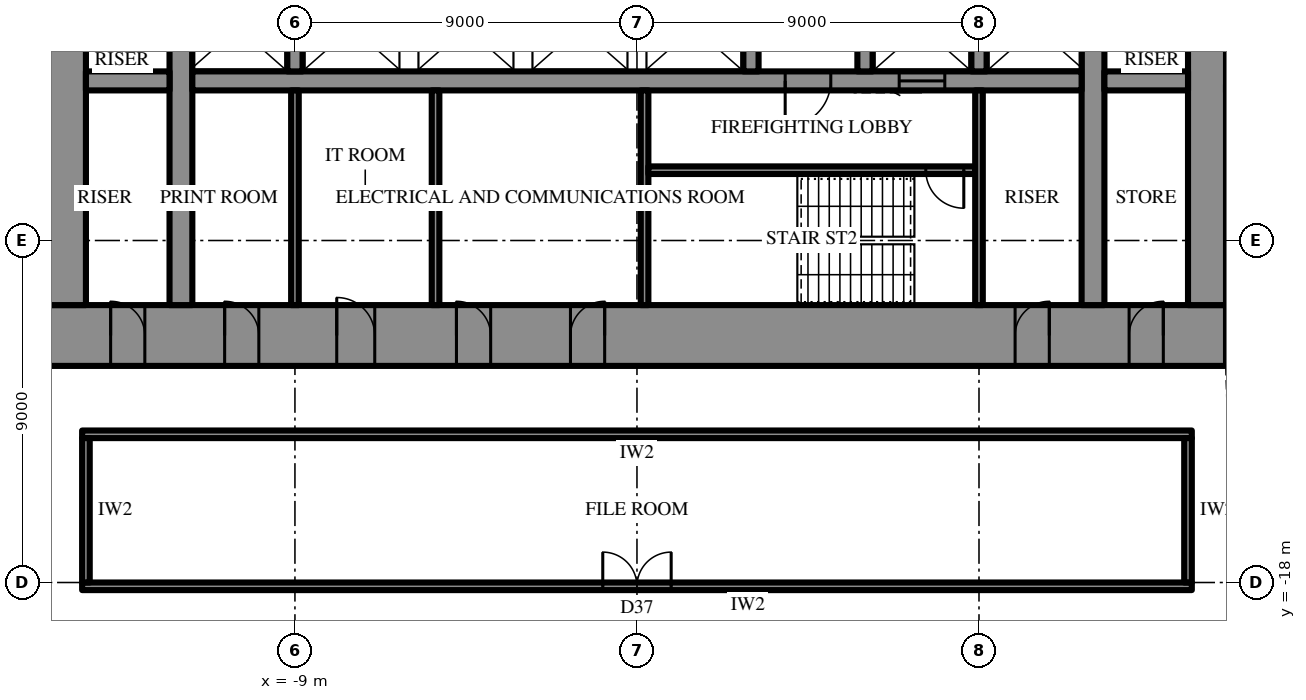
"""IFC4 building model, lengths in metres.
Left out: names, types, materials, properties, quantities, classifications, styles, units other than length and angle.
Written with IfcOpenShell. Run it as: python <this file> out.ifc"""

import sys

from ifc_helpers import new_model, si_unit, direction, frame, frame_2d, origin, place, context, subcontext, project, spatial, rectangle, extrude, element, fill, save


model = new_model("IFC4")
c1 = context("Model", 3, precision=1e-05, world=origin(), true_north=direction((0.0, 1.0)))
c2 = subcontext(c1, "Body", "Model", "MODEL_VIEW")
j1 = project(units=[si_unit("LENGTHUNIT", "METRE"), si_unit("PLANEANGLEUNIT", "RADIAN")], contexts=[c1])
p1 = place(None, origin())
s1 = spatial("IfcSite", under=j1, at=p1, CompositionType="ELEMENT")
p2 = place(p1, origin())
s2 = spatial("IfcBuilding", under=s1, at=p2, CompositionType="ELEMENT")
p3 = place(p2, frame((0.0, 0.0, 232.3)))
s3 = spatial("IfcBuildingStorey", under=s2, at=p3, CompositionType="ELEMENT", Elevation=232.3)
p4 = place(p3, frame((15.5, -11.5, 0.0), z_axis=(0.0, 0.0, 1.0), x_axis=(-1.0, 0.0, 0.0)))
e1 = element("IfcWall", 1, at=p4, inside=s3, PredefinedType="SHEAR", context=c2, shape_type="SweptSolid", body=[
    extrude(rectangle(XDim=31.0, YDim=1.6, at=frame_2d((15.5, 0.0))), origin(), (0.0, 0.0, 1.0), 4.2),
])
p5 = place(p4, frame((16.35, 0.0, 0.0)))
e2 = element("IfcOpeningElement", 2, at=p5, cuts=e1, PredefinedType="OPENING", context=c2, shape_type="SweptSolid", body=[
    extrude(rectangle(XDim=0.9, YDim=2.2, at=frame_2d((0.45, 1.1))), frame((0.0, 0.81, 0.0), z_axis=(0.0, -1.0, 0.0), x_axis=(1.0, 0.0, 0.0)), (0.0, 0.0, 1.0), 1.62),
])
p6 = place(p4, frame((19.35, 0.0, 0.0)))
e3 = element("IfcOpeningElement", 3, at=p6, cuts=e1, PredefinedType="OPENING", context=c2, shape_type="SweptSolid", body=[
    extrude(rectangle(XDim=0.9, YDim=2.2, at=frame_2d((0.45, 1.1))), frame((0.0, 0.81, 0.0), z_axis=(0.0, -1.0, 0.0), x_axis=(1.0, 0.0, 0.0)), (0.0, 0.0, 1.0), 1.62),
])
p7 = place(p4, frame((22.4, 0.0, 0.0)))
e4 = element("IfcOpeningElement", 4, at=p7, cuts=e1, PredefinedType="OPENING", context=c2, shape_type="SweptSolid", body=[
    extrude(rectangle(XDim=1.0, YDim=2.2, at=frame_2d((0.5, 1.1))), frame((0.0, 0.81, 0.0), z_axis=(0.0, -1.0, 0.0), x_axis=(1.0, 0.0, 0.0)), (0.0, 0.0, 1.0), 1.62),
])
p8 = place(p4, frame((1.65, 0.0, 0.0)))
e5 = element("IfcOpeningElement", 5, at=p8, cuts=e1, PredefinedType="OPENING", context=c2, shape_type="SweptSolid", body=[
    extrude(rectangle(XDim=0.9, YDim=2.2, at=frame_2d((0.45, 1.1))), frame((0.0, 0.81, 0.0), z_axis=(0.0, -1.0, 0.0), x_axis=(1.0, 0.0, 0.0)), (0.0, 0.0, 1.0), 1.62),
])
p9 = place(p4, frame((4.65, 0.0, 0.0)))
e6 = element("IfcOpeningElement", 6, at=p9, cuts=e1, PredefinedType="OPENING", context=c2, shape_type="SweptSolid", body=[
    extrude(rectangle(XDim=0.9, YDim=2.2, at=frame_2d((0.45, 1.1))), frame((0.0, 0.81, 0.0), z_axis=(0.0, -1.0, 0.0), x_axis=(1.0, 0.0, 0.0)), (0.0, 0.0, 1.0), 1.62),
])
p10 = place(p4, frame((25.45, 0.0, 0.0)))
e7 = element("IfcOpeningElement", 7, at=p10, cuts=e1, PredefinedType="OPENING", context=c2, shape_type="SweptSolid", body=[
    extrude(rectangle(XDim=0.9, YDim=2.2, at=frame_2d((0.45, 1.1))), frame((0.0, 0.81, 0.0), z_axis=(0.0, -1.0, 0.0), x_axis=(1.0, 0.0, 0.0)), (0.0, 0.0, 1.0), 1.62),
])
p11 = place(p4, frame((28.45, 0.0, 0.0)))
e8 = element("IfcOpeningElement", 8, at=p11, cuts=e1, PredefinedType="OPENING", context=c2, shape_type="SweptSolid", body=[
    extrude(rectangle(XDim=0.9, YDim=2.2, at=frame_2d((0.45, 1.1))), frame((0.0, 0.81, 0.0), z_axis=(0.0, -1.0, 0.0), x_axis=(1.0, 0.0, 0.0)), (0.0, 0.0, 1.0), 1.62),
])
p12 = place(p3, frame((15.0, -10.7, 0.0), z_axis=(0.0, 0.0, 1.0), x_axis=(0.0, 1.0, 0.0)))
e9 = element("IfcWall", 9, at=p12, inside=s3, PredefinedType="SHEAR", context=c2, shape_type="SweptSolid", body=[
    extrude(rectangle(XDim=21.4, YDim=1.0, at=frame_2d((10.7, 0.0))), origin(), (0.0, 0.0, 1.0), 4.2),
])
p13 = place(p12, frame((9.8, 0.0, 0.0)))
e10 = element("IfcOpeningElement", 10, at=p13, cuts=e9, PredefinedType="OPENING", context=c2, shape_type="SweptSolid", body=[
    extrude(rectangle(XDim=1.8, YDim=2.4, at=frame_2d((0.9, 1.2))), frame((0.0, 0.51, 0.0), z_axis=(0.0, -1.0, 0.0), x_axis=(1.0, 0.0, 0.0)), (0.0, 0.0, 1.0), 1.02),
])
p14 = place(p3, frame((-15.0, 10.7, 0.0), z_axis=(0.0, 0.0, 1.0), x_axis=(0.0, -1.0, 0.0)))
e11 = element("IfcWall", 11, at=p14, inside=s3, PredefinedType="SHEAR", context=c2, shape_type="SweptSolid", body=[
    extrude(rectangle(XDim=21.4, YDim=1.0, at=frame_2d((10.7, 0.0))), origin(), (0.0, 0.0, 1.0), 4.2),
])
p15 = place(p14, frame((9.8, 0.0, 0.0)))
e12 = element("IfcOpeningElement", 12, at=p15, cuts=e11, PredefinedType="OPENING", context=c2, shape_type="SweptSolid", body=[
    extrude(rectangle(XDim=1.8, YDim=2.4, at=frame_2d((0.9, 1.2))), frame((0.0, 0.51, 0.0), z_axis=(0.0, -1.0, 0.0), x_axis=(1.0, 0.0, 0.0)), (0.0, 0.0, 1.0), 1.02),
])
p16 = place(p3, frame((12.0, -10.7, 0.0), z_axis=(0.0, 0.0, 1.0), x_axis=(0.0, 1.0, 0.0)))
e13 = element("IfcWall", 13, at=p16, inside=s3, PredefinedType="SHEAR", context=c2, shape_type="SweptSolid", body=[
    extrude(rectangle(XDim=21.4, YDim=0.6, at=frame_2d((10.7, 0.0))), origin(), (0.0, 0.0, 1.0), 4.2),
])
p17 = place(p16, frame((9.8, 0.0, 0.0)))
e14 = element("IfcOpeningElement", 14, at=p17, cuts=e13, PredefinedType="OPENING", context=c2, shape_type="SweptSolid", body=[
    extrude(rectangle(XDim=1.8, YDim=2.4, at=frame_2d((0.9, 1.2))), frame((0.0, 0.31, 0.0), z_axis=(0.0, -1.0, 0.0), x_axis=(1.0, 0.0, 0.0)), (0.0, 0.0, 1.0), 0.62),
])
p18 = place(p3, frame((-12.0, -10.7, 0.0), z_axis=(0.0, 0.0, 1.0), x_axis=(0.0, 1.0, 0.0)))
e15 = element("IfcWall", 15, at=p18, inside=s3, PredefinedType="SHEAR", context=c2, shape_type="SweptSolid", body=[
    extrude(rectangle(XDim=21.4, YDim=0.6, at=frame_2d((10.7, 0.0))), origin(), (0.0, 0.0, 1.0), 4.2),
])
p19 = place(p18, frame((9.8, 0.0, 0.0)))
e16 = element("IfcOpeningElement", 16, at=p19, cuts=e15, PredefinedType="OPENING", context=c2, shape_type="SweptSolid", body=[
    extrude(rectangle(XDim=1.8, YDim=2.4, at=frame_2d((0.9, 1.2))), frame((0.0, 0.31, 0.0), z_axis=(0.0, -1.0, 0.0), x_axis=(1.0, 0.0, 0.0)), (0.0, 0.0, 1.0), 0.62),
])
p20 = place(p3, frame((14.5, -4.8, 0.0), z_axis=(0.0, 0.0, 1.0), x_axis=(-1.0, 0.0, 0.0)))
e17 = element("IfcWall", 17, at=p20, inside=s3, PredefinedType="SHEAR", context=c2, shape_type="SweptSolid", body=[
    extrude(rectangle(XDim=2.2, YDim=0.5, at=frame_2d((1.1, 0.0))), origin(), (0.0, 0.0, 1.0), 4.2),
])
p21 = place(p3, frame((11.7, -4.8, 0.0), z_axis=(0.0, 0.0, 1.0), x_axis=(-1.0, 0.0, 0.0)))
e18 = element("IfcWall", 18, at=p21, inside=s3, PredefinedType="SHEAR", context=c2, shape_type="SweptSolid", body=[
    extrude(rectangle(XDim=23.4, YDim=0.5, at=frame_2d((11.7, 0.0))), origin(), (0.0, 0.0, 1.0), 4.2),
])
p22 = place(p21, frame((6.6, 0.0, 0.0)))
e19 = element("IfcOpeningElement", 19, at=p22, cuts=e18, PredefinedType="OPENING", context=c2, shape_type="SweptSolid", body=[
    extrude(rectangle(XDim=1.2, YDim=2.2, at=frame_2d((0.6, 1.1))), frame((0.0, 0.26, 0.0), z_axis=(0.0, -1.0, 0.0), x_axis=(1.0, 0.0, 0.0)), (0.0, 0.0, 1.0), 0.52),
])
p23 = place(p21, frame((3.6, 0.0, 0.0)))
e20 = element("IfcOpeningElement", 20, at=p23, cuts=e18, PredefinedType="OPENING", context=c2, shape_type="SweptSolid", body=[
    extrude(rectangle(XDim=1.2, YDim=2.2, at=frame_2d((0.6, 1.1))), frame((0.0, 0.26, 0.0), z_axis=(0.0, -1.0, 0.0), x_axis=(1.0, 0.0, 0.0)), (0.0, 0.0, 1.0), 0.52),
])
p24 = place(p3, frame((-12.3, -4.8, 0.0), z_axis=(0.0, 0.0, 1.0), x_axis=(-1.0, 0.0, 0.0)))
e21 = element("IfcWall", 21, at=p24, inside=s3, PredefinedType="SHEAR", context=c2, shape_type="SweptSolid", body=[
    extrude(rectangle(XDim=2.2, YDim=0.5, at=frame_2d((1.1, 0.0))), origin(), (0.0, 0.0, 1.0), 4.2),
])
for number, where, z_axis, x_axis in (
    (22, (9.0, -2.25, 0.0), (0.0, 0.0, 1.0), (0.0, -1.0, 0.0)),
    (23, (6.0, -2.25, 0.0), (0.0, 0.0, 1.0), (0.0, -1.0, 0.0)),
    (24, (3.0, -2.25, 0.0), (0.0, 0.0, 1.0), (0.0, -1.0, 0.0)),
    (25, (-9.0, -2.25, 0.0), (0.0, 0.0, 1.0), (0.0, -1.0, 0.0)),
):
    element("IfcWall", number, at=place(p3, frame(where, z_axis=z_axis, x_axis=x_axis)), inside=s3, PredefinedType="SHEAR", context=c2, shape_type="SweptSolid", body=[
        extrude(rectangle(XDim=2.3, YDim=0.4, at=frame_2d((1.15, 0.0))), origin(), (0.0, 0.0, 1.0), 4.2),
    ])
p25 = place(p3, frame((0.2, -5.05, 0.0), z_axis=(0.0, 0.0, 1.0), x_axis=(0.0, -1.0, 0.0)))
e26 = element("IfcWall", 26, at=p25, inside=s3, PredefinedType="SHEAR", context=c2, shape_type="SweptSolid", body=[
    extrude(rectangle(XDim=5.65, YDim=0.2, at=frame_2d((2.825, 0.0))), origin(), (0.0, 0.0, 1.0), 4.2),
])
p26 = place(p3, frame((8.9, -7.15, 0.0), z_axis=(0.0, 0.0, 1.0), x_axis=(-1.0, 0.0, 0.0)))
e27 = element("IfcWall", 27, at=p26, inside=s3, PredefinedType="SHEAR", context=c2, shape_type="SweptSolid", body=[
    extrude(rectangle(XDim=8.6, YDim=0.2, at=frame_2d((4.3, 0.0))), origin(), (0.0, 0.0, 1.0), 4.2),
])
p27 = place(p26, frame((0.3, 0.0, 0.0)))
e28 = element("IfcOpeningElement", 28, at=p27, cuts=e27, PredefinedType="OPENING", context=c2, shape_type="SweptSolid", body=[
    extrude(rectangle(XDim=1.0, YDim=2.2, at=frame_2d((0.5, 1.1))), frame((0.0, 0.11, 0.0), z_axis=(0.0, -1.0, 0.0), x_axis=(1.0, 0.0, 0.0)), (0.0, 0.0, 1.0), 0.22),
])
for number, where, z_axis, x_axis in (
    (29, (9.0, -5.05, 0.0), (0.0, 0.0, 1.0), (0.0, -1.0, 0.0)),
    (30, (-9.0, -5.05, 0.0), (0.0, 0.0, 1.0), (0.0, -1.0, 0.0)),
    (31, (-5.3, -5.05, 0.0), (0.0, 0.0, 1.0), (0.0, -1.0, 0.0)),
):
    element("IfcWall", number, at=place(p3, frame(where, z_axis=z_axis, x_axis=x_axis)), inside=s3, PredefinedType="PARTITIONING", context=c2, shape_type="SweptSolid", body=[
        extrude(rectangle(XDim=5.65, YDim=0.2, at=frame_2d((2.825, 0.0))), origin(), (0.0, 0.0, 1.0), 4.0),
    ])
p28 = place(p3, frame((14.6, -14.1, 0.0), z_axis=(0.0, 0.0, 1.0), x_axis=(-1.0, 0.0, 0.0)))
e32 = element("IfcWall", 32, at=p28, inside=s3, PredefinedType="PARTITIONING", context=c2, shape_type="SweptSolid", body=[
    extrude(rectangle(XDim=29.2, YDim=0.2, at=frame_2d((14.6, 0.0))), origin(), (0.0, 0.0, 1.0), 4.0),
])
p29 = place(p3, frame((14.6, -18.1, 0.0), z_axis=(0.0, 0.0, 1.0), x_axis=(-1.0, 0.0, 0.0)))
e33 = element("IfcWall", 33, at=p29, inside=s3, PredefinedType="PARTITIONING", context=c2, shape_type="SweptSolid", body=[
    extrude(rectangle(XDim=29.2, YDim=0.2, at=frame_2d((14.6, 0.0))), origin(), (0.0, 0.0, 1.0), 4.0),
])
p30 = place(p29, frame((13.7, 0.0, 0.0)))
e34 = element("IfcOpeningElement", 34, at=p30, cuts=e33, PredefinedType="OPENING", context=c2, shape_type="SweptSolid", body=[
    extrude(rectangle(XDim=1.8, YDim=2.4, at=frame_2d((0.9, 1.2))), frame((0.0, 0.11, 0.0), z_axis=(0.0, -1.0, 0.0), x_axis=(1.0, 0.0, 0.0)), (0.0, 0.0, 1.0), 0.22),
])
for number, where, z_axis, x_axis in (
    (35, (14.5, -14.2, 0.0), (0.0, 0.0, 1.0), (0.0, -1.0, 0.0)),
    (36, (-14.5, -14.2, 0.0), (0.0, 0.0, 1.0), (0.0, -1.0, 0.0)),
):
    element("IfcWall", number, at=place(p3, frame(where, z_axis=z_axis, x_axis=x_axis)), inside=s3, PredefinedType="PARTITIONING", context=c2, shape_type="SweptSolid", body=[
        extrude(rectangle(XDim=3.8, YDim=0.2, at=frame_2d((1.9, 0.0))), origin(), (0.0, 0.0, 1.0), 4.0),
    ])
p31 = place(p22, origin())
e37 = element("IfcDoor", 37, at=p31, inside=s3, OperationType="SINGLE_SWING_LEFT", PredefinedType="DOOR", context=c2, shape_type="SweptSolid", body=[
    extrude(rectangle(XDim=1.2, YDim=2.2, at=frame_2d((0.6, 1.1))), frame((0.0, 0.025, 0.0), z_axis=(0.0, -1.0, 0.0), x_axis=(1.0, 0.0, 0.0)), (0.0, 0.0, 1.0), 0.05),
])
fill(e19, e37)
p32 = place(p27, origin())
e38 = element("IfcDoor", 38, at=p32, inside=s3, OperationType="SINGLE_SWING_RIGHT", PredefinedType="DOOR", context=c2, shape_type="SweptSolid", body=[
    extrude(rectangle(XDim=1.0, YDim=2.2, at=frame_2d((0.5, 1.1))), frame((0.0, 0.025, 0.0), z_axis=(0.0, -1.0, 0.0), x_axis=(1.0, 0.0, 0.0)), (0.0, 0.0, 1.0), 0.05),
])
fill(e28, e38)
p33 = place(p5, frame((0.9, 0.0, 0.0), z_axis=(0.0, 0.0, 1.0), x_axis=(-1.0, 0.0, 0.0)))
e39 = element("IfcDoor", 39, at=p33, inside=s3, OperationType="SINGLE_SWING_LEFT", PredefinedType="DOOR", context=c2, shape_type="SweptSolid", body=[
    extrude(rectangle(XDim=0.9, YDim=2.2, at=frame_2d((0.45, 1.1))), frame((0.0, 0.025, 0.0), z_axis=(0.0, -1.0, 0.0), x_axis=(1.0, 0.0, 0.0)), (0.0, 0.0, 1.0), 0.05),
])
fill(e2, e39)
p34 = place(p6, frame((0.9, 0.0, 0.0), z_axis=(0.0, 0.0, 1.0), x_axis=(-1.0, 0.0, 0.0)))
e40 = element("IfcDoor", 40, at=p34, inside=s3, OperationType="SINGLE_SWING_RIGHT", PredefinedType="DOOR", context=c2, shape_type="SweptSolid", body=[
    extrude(rectangle(XDim=0.9, YDim=2.2, at=frame_2d((0.45, 1.1))), frame((0.0, 0.025, 0.0), z_axis=(0.0, -1.0, 0.0), x_axis=(1.0, 0.0, 0.0)), (0.0, 0.0, 1.0), 0.05),
])
fill(e3, e40)
p35 = place(p7, frame((1.0, 0.0, 0.0), z_axis=(0.0, 0.0, 1.0), x_axis=(-1.0, 0.0, 0.0)))
e41 = element("IfcDoor", 41, at=p35, inside=s3, OperationType="SINGLE_SWING_RIGHT", PredefinedType="DOOR", context=c2, shape_type="SweptSolid", body=[
    extrude(rectangle(XDim=1.0, YDim=2.2, at=frame_2d((0.5, 1.1))), frame((0.0, 0.025, 0.0), z_axis=(0.0, -1.0, 0.0), x_axis=(1.0, 0.0, 0.0)), (0.0, 0.0, 1.0), 0.05),
])
fill(e4, e41)
p36 = place(p8, frame((0.9, 0.0, 0.0), z_axis=(0.0, 0.0, 1.0), x_axis=(-1.0, 0.0, 0.0)))
e42 = element("IfcDoor", 42, at=p36, inside=s3, OperationType="SINGLE_SWING_LEFT", PredefinedType="DOOR", context=c2, shape_type="SweptSolid", body=[
    extrude(rectangle(XDim=0.9, YDim=2.2, at=frame_2d((0.45, 1.1))), frame((0.0, 0.025, 0.0), z_axis=(0.0, -1.0, 0.0), x_axis=(1.0, 0.0, 0.0)), (0.0, 0.0, 1.0), 0.05),
])
fill(e5, e42)
p37 = place(p9, frame((0.9, 0.0, 0.0), z_axis=(0.0, 0.0, 1.0), x_axis=(-1.0, 0.0, 0.0)))
e43 = element("IfcDoor", 43, at=p37, inside=s3, OperationType="SINGLE_SWING_LEFT", PredefinedType="DOOR", context=c2, shape_type="SweptSolid", body=[
    extrude(rectangle(XDim=0.9, YDim=2.2, at=frame_2d((0.45, 1.1))), frame((0.0, 0.025, 0.0), z_axis=(0.0, -1.0, 0.0), x_axis=(1.0, 0.0, 0.0)), (0.0, 0.0, 1.0), 0.05),
])
fill(e6, e43)
p38 = place(p10, frame((0.9, 0.0, 0.0), z_axis=(0.0, 0.0, 1.0), x_axis=(-1.0, 0.0, 0.0)))
e44 = element("IfcDoor", 44, at=p38, inside=s3, OperationType="SINGLE_SWING_RIGHT", PredefinedType="DOOR", context=c2, shape_type="SweptSolid", body=[
    extrude(rectangle(XDim=0.9, YDim=2.2, at=frame_2d((0.45, 1.1))), frame((0.0, 0.025, 0.0), z_axis=(0.0, -1.0, 0.0), x_axis=(1.0, 0.0, 0.0)), (0.0, 0.0, 1.0), 0.05),
])
fill(e7, e44)
p39 = place(p11, frame((0.9, 0.0, 0.0), z_axis=(0.0, 0.0, 1.0), x_axis=(-1.0, 0.0, 0.0)))
e45 = element("IfcDoor", 45, at=p39, inside=s3, OperationType="SINGLE_SWING_RIGHT", PredefinedType="DOOR", context=c2, shape_type="SweptSolid", body=[
    extrude(rectangle(XDim=0.9, YDim=2.2, at=frame_2d((0.45, 1.1))), frame((0.0, 0.025, 0.0), z_axis=(0.0, -1.0, 0.0), x_axis=(1.0, 0.0, 0.0)), (0.0, 0.0, 1.0), 0.05),
])
fill(e8, e45)
p40 = place(p23, origin())
e46 = element("IfcDoor", 46, at=p40, inside=s3, OperationType="SLIDING_TO_LEFT", PredefinedType="DOOR", context=c2, shape_type="SweptSolid", body=[
    extrude(rectangle(XDim=1.2, YDim=2.2, at=frame_2d((0.6, 1.1))), frame((0.0, 0.025, 0.0), z_axis=(0.0, -1.0, 0.0), x_axis=(1.0, 0.0, 0.0)), (0.0, 0.0, 1.0), 0.05),
])
fill(e20, e46)
p41 = place(p30, frame((1.8, 0.0, 0.0), z_axis=(0.0, 0.0, 1.0), x_axis=(-1.0, 0.0, 0.0)))
e47 = element("IfcDoor", 47, at=p41, inside=s3, OperationType="DOUBLE_DOOR_SINGLE_SWING", PredefinedType="DOOR", context=c2, shape_type="SweptSolid", body=[
    extrude(rectangle(XDim=1.8, YDim=2.4, at=frame_2d((0.9, 1.2))), frame((0.0, 0.025, 0.0), z_axis=(0.0, -1.0, 0.0), x_axis=(1.0, 0.0, 0.0)), (0.0, 0.0, 1.0), 0.05),
])
fill(e34, e47)
save(model, sys.argv[1])
